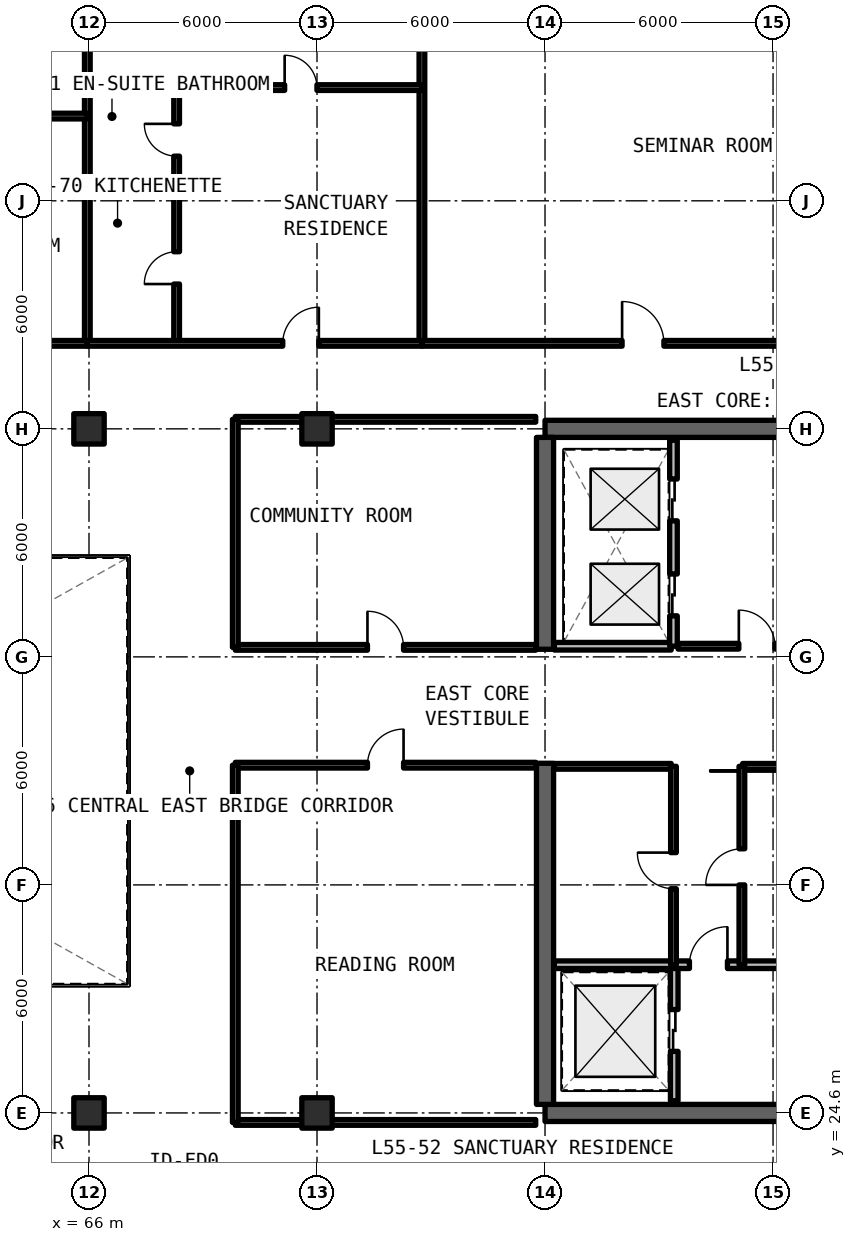
"""IFC4 building model, lengths in metres.
Left out: names, types, materials, properties, quantities, classifications, styles, units other than length and angle.
Written with IfcOpenShell. Run it as: python <this file> out.ifc"""

import sys

from ifc_helpers import new_model, si_unit, direction, frame, frame_2d, origin, origin_2d, place, context, subcontext, project, spatial, rectangle, extrude, element, fill, save


model = new_model("IFC4")
c1 = context("Model", 3, precision=1e-05, world=origin(), true_north=direction((0.0, 1.0)))
c2 = subcontext(c1, "Body", "Model", "MODEL_VIEW")
j1 = project(units=[si_unit("LENGTHUNIT", "METRE"), si_unit("PLANEANGLEUNIT", "RADIAN")], contexts=[c1])
p1 = place(None, origin())
s1 = spatial("IfcSite", under=j1, at=p1, CompositionType="ELEMENT")
p2 = place(p1, origin())
s2 = spatial("IfcBuilding", under=s1, at=p2, CompositionType="ELEMENT")
p3 = place(p2, frame((0.0, 0.0, 198.33)))
s3 = spatial("IfcBuildingStorey", under=s2, at=p3, CompositionType="ELEMENT", Elevation=198.33)
for number, where, z_axis, x_axis in (
    (1, (78.0, 24.6, 0.0), (0.0, 0.0, 1.0), (1.0, 0.0, 0.0)),
    (2, (90.0, 42.6, 0.0), (0.0, 0.0, 1.0), (-1.0, 0.0, 0.0)),
):
    element("IfcWall", number, at=place(p3, frame(where, z_axis=z_axis, x_axis=x_axis)), inside=s3, PredefinedType="SHEAR", context=c2, shape_type="SweptSolid", body=[
        extrude(rectangle(XDim=12.0, YDim=0.45, at=frame_2d((6.0, 0.0))), origin(), (0.0, 0.0, 1.0), 3.3),
    ])
p4 = place(p3, frame((78.0, 24.825, 0.0), z_axis=(0.0, 0.0, 1.0), x_axis=(0.0, 1.0, 0.0)))
e3 = element("IfcWall", 3, at=p4, inside=s3, PredefinedType="SHEAR", context=c2, shape_type="SweptSolid", body=[
    extrude(rectangle(XDim=8.975, YDim=0.45, at=frame_2d((4.488, 0.0))), origin(), (0.0, 0.0, 1.0), 3.3),
])
p5 = place(p3, frame((78.0, 36.8, 0.0), z_axis=(0.0, 0.0, 1.0), x_axis=(0.0, 1.0, 0.0)))
e4 = element("IfcWall", 4, at=p5, inside=s3, PredefinedType="SHEAR", context=c2, shape_type="SweptSolid", body=[
    extrude(rectangle(XDim=5.575, YDim=0.45, at=frame_2d((2.788, 0.0))), origin(), (0.0, 0.0, 1.0), 3.3),
])
for number, where, z_axis, x_axis in (
    (5, (66.0, 24.6, 0.0), (0.0, 0.0, 1.0), (1.0, 0.0, 0.0)),
    (6, (66.0, 42.6, 0.0), (0.0, 0.0, 1.0), (1.0, 0.0, 0.0)),
    (7, (72.0, 24.6, 0.0), (0.0, 0.0, 1.0), (1.0, 0.0, 0.0)),
    (8, (72.0, 42.6, 0.0), (0.0, 0.0, 1.0), (1.0, 0.0, 0.0)),
):
    element("IfcColumn", number, at=place(p3, frame(where, z_axis=z_axis, x_axis=x_axis)), inside=s3, PredefinedType="COLUMN", context=c2, shape_type="SweptSolid", body=[
        extrude(rectangle(XDim=0.8, YDim=0.8, at=origin_2d()), origin(), (0.0, 0.0, 1.0), 3.3),
    ])
p6 = place(p3, frame((81.4, 24.92, 0.0), z_axis=(0.0, 0.0, 1.0), x_axis=(0.0, 1.0, 0.0)))
e9 = element("IfcWall", 9, at=p6, inside=s3, PredefinedType="SOLIDWALL", context=c2, shape_type="SweptSolid", body=[
    extrude(rectangle(XDim=3.58, YDim=0.2, at=frame_2d((1.79, 0.0))), origin(), (0.0, 0.0, 1.0), 2.35),
])
p7 = place(p6, frame((1.3, 0.0, 0.0)))
e10 = element("IfcOpeningElement", 10, at=p7, cuts=e9, PredefinedType="OPENING", context=c2, shape_type="SweptSolid", body=[
    extrude(rectangle(XDim=1.1, YDim=2.2, at=frame_2d((0.55, 1.1))), frame((0.0, 0.11, 0.0), z_axis=(0.0, -1.0, 0.0), x_axis=(1.0, 0.0, 0.0)), (0.0, 0.0, 1.0), 0.22),
])
p8 = place(p3, frame((78.245, 28.5, 0.0), z_axis=(0.0, 0.0, 1.0), x_axis=(1.0, 0.0, 0.0)))
e11 = element("IfcWall", 11, at=p8, inside=s3, PredefinedType="SOLIDWALL", context=c2, shape_type="SweptSolid", body=[
    extrude(rectangle(XDim=7.585, YDim=0.2, at=frame_2d((3.792, 0.0))), origin(), (0.0, 0.0, 1.0), 2.35),
])
p9 = place(p8, frame((3.555, 0.0, 0.0)))
e12 = element("IfcOpeningElement", 12, at=p9, cuts=e11, PredefinedType="OPENING", context=c2, shape_type="SweptSolid", body=[
    extrude(rectangle(XDim=1.0, YDim=2.15, at=frame_2d((0.5, 1.075))), frame((0.0, 0.11, 0.0), z_axis=(0.0, -1.0, 0.0), x_axis=(1.0, 0.0, 0.0)), (0.0, 0.0, 1.0), 0.22),
])
p10 = place(p3, frame((83.2, 33.72, 0.0), z_axis=(0.0, 0.0, 1.0), x_axis=(1.0, 0.0, 0.0)))
e13 = element("IfcWall", 13, at=p10, inside=s3, PredefinedType="SOLIDWALL", context=c2, shape_type="SweptSolid", body=[
    extrude(rectangle(XDim=2.63, YDim=0.15, at=frame_2d((1.315, 0.0))), origin(), (0.0, 0.0, 1.0), 2.35),
])
p11 = place(p3, frame((83.18, 28.5, 0.0), z_axis=(0.0, 0.0, 1.0), x_axis=(0.0, 1.0, 0.0)))
e14 = element("IfcWall", 14, at=p11, inside=s3, PredefinedType="SOLIDWALL", context=c2, shape_type="SweptSolid", body=[
    extrude(rectangle(XDim=5.22, YDim=0.15, at=frame_2d((2.61, 0.0))), origin(), (0.0, 0.0, 1.0), 2.35),
])
p12 = place(p11, frame((2.1, 0.0, 0.0)))
e15 = element("IfcOpeningElement", 15, at=p12, cuts=e14, PredefinedType="OPENING", context=c2, shape_type="SweptSolid", body=[
    extrude(rectangle(XDim=0.95, YDim=2.15, at=frame_2d((0.475, 1.075))), frame((0.0, 0.085, 0.0), z_axis=(0.0, -1.0, 0.0), x_axis=(1.0, 0.0, 0.0)), (0.0, 0.0, 1.0), 0.17),
])
p13 = place(p3, frame((78.245, 33.72, 0.0), z_axis=(0.0, 0.0, 1.0), x_axis=(1.0, 0.0, 0.0)))
e16 = element("IfcWall", 16, at=p13, inside=s3, PredefinedType="SOLIDWALL", context=c2, shape_type="SweptSolid", body=[
    extrude(rectangle(XDim=3.075, YDim=0.15, at=frame_2d((1.538, 0.0))), origin(), (0.0, 0.0, 1.0), 2.35),
])
p14 = place(p3, frame((81.38, 28.5, 0.0), z_axis=(0.0, 0.0, 1.0), x_axis=(0.0, 1.0, 0.0)))
e17 = element("IfcWall", 17, at=p14, inside=s3, PredefinedType="SOLIDWALL", context=c2, shape_type="SweptSolid", body=[
    extrude(rectangle(XDim=5.22, YDim=0.15, at=frame_2d((2.61, 0.0))), origin(), (0.0, 0.0, 1.0), 2.35),
])
p15 = place(p14, frame((2.0, 0.0, 0.0)))
e18 = element("IfcOpeningElement", 18, at=p15, cuts=e17, PredefinedType="OPENING", context=c2, shape_type="SweptSolid", body=[
    extrude(rectangle(XDim=0.95, YDim=2.15, at=frame_2d((0.475, 1.075))), frame((0.0, 0.085, 0.0), z_axis=(0.0, -1.0, 0.0), x_axis=(1.0, 0.0, 0.0)), (0.0, 0.0, 1.0), 0.17),
])
p16 = place(p3, frame((81.5, 36.88, 0.0), z_axis=(0.0, 0.0, 1.0), x_axis=(1.0, 0.0, 0.0)))
e19 = element("IfcWall", 19, at=p16, inside=s3, PredefinedType="SOLIDWALL", context=c2, shape_type="SweptSolid", body=[
    extrude(rectangle(XDim=4.33, YDim=0.15, at=frame_2d((2.165, 0.0))), origin(), (0.0, 0.0, 1.0), 2.35),
])
p17 = place(p16, frame((1.6, 0.0, 0.0)))
e20 = element("IfcOpeningElement", 20, at=p17, cuts=e19, PredefinedType="OPENING", context=c2, shape_type="SweptSolid", body=[
    extrude(rectangle(XDim=0.95, YDim=2.15, at=frame_2d((0.475, 1.075))), frame((0.0, 0.085, 0.0), z_axis=(0.0, -1.0, 0.0), x_axis=(1.0, 0.0, 0.0)), (0.0, 0.0, 1.0), 0.17),
])
p18 = place(p3, frame((78.245, 36.88, 0.0), z_axis=(0.0, 0.0, 1.0), x_axis=(1.0, 0.0, 0.0)))
e21 = element("IfcWall", 21, at=p18, inside=s3, PredefinedType="SOLIDWALL", context=c2, shape_type="SweptSolid", body=[
    extrude(rectangle(XDim=3.075, YDim=0.2, at=frame_2d((1.538, 0.0))), origin(), (0.0, 0.0, 1.0), 2.35),
])
p19 = place(p3, frame((81.38, 36.88, 0.0), z_axis=(0.0, 0.0, 1.0), x_axis=(0.0, 1.0, 0.0)))
e22 = element("IfcWall", 22, at=p19, inside=s3, PredefinedType="SOLIDWALL", context=c2, shape_type="SweptSolid", body=[
    extrude(rectangle(XDim=5.42, YDim=0.2, at=frame_2d((2.71, 0.0))), origin(), (0.0, 0.0, 1.0), 2.35),
])
p20 = place(p19, frame((0.8, 0.0, 0.0)))
e23 = element("IfcOpeningElement", 23, at=p20, cuts=e22, PredefinedType="OPENING", context=c2, shape_type="SweptSolid", body=[
    extrude(rectangle(XDim=1.1, YDim=2.2, at=frame_2d((0.55, 1.1))), frame((0.0, 0.11, 0.0), z_axis=(0.0, -1.0, 0.0), x_axis=(1.0, 0.0, 0.0)), (0.0, 0.0, 1.0), 0.22),
])
p21 = place(p19, frame((3.3, 0.0, 0.0)))
e24 = element("IfcOpeningElement", 24, at=p21, cuts=e22, PredefinedType="OPENING", context=c2, shape_type="SweptSolid", body=[
    extrude(rectangle(XDim=1.1, YDim=2.2, at=frame_2d((0.55, 1.1))), frame((0.0, 0.11, 0.0), z_axis=(0.0, -1.0, 0.0), x_axis=(1.0, 0.0, 0.0)), (0.0, 0.0, 1.0), 0.22),
])
p22 = place(p3, frame((69.85, 24.35, 0.0), z_axis=(0.0, 0.0, 1.0), x_axis=(1.0, 0.0, 0.0)))
e25 = element("IfcWall", 25, at=p22, inside=s3, PredefinedType="SOLIDWALL", context=c2, shape_type="SweptSolid", body=[
    extrude(rectangle(XDim=7.905, YDim=0.15, at=frame_2d((3.952, 0.0))), origin(), (0.0, 0.0, 1.0), 2.35),
])
p23 = place(p3, frame((69.85, 33.75, 0.0), z_axis=(0.0, 0.0, 1.0), x_axis=(1.0, 0.0, 0.0)))
e26 = element("IfcWall", 26, at=p23, inside=s3, PredefinedType="SOLIDWALL", context=c2, shape_type="SweptSolid", body=[
    extrude(rectangle(XDim=7.905, YDim=0.15, at=frame_2d((3.952, 0.0))), origin(), (0.0, 0.0, 1.0), 2.35),
])
p24 = place(p23, frame((3.478, 0.0, 0.0)))
e27 = element("IfcOpeningElement", 27, at=p24, cuts=e26, PredefinedType="OPENING", context=c2, shape_type="SweptSolid", body=[
    extrude(rectangle(XDim=0.95, YDim=2.15, at=frame_2d((0.475, 1.075))), frame((0.0, 0.085, 0.0), z_axis=(0.0, -1.0, 0.0), x_axis=(1.0, 0.0, 0.0)), (0.0, 0.0, 1.0), 0.17),
])
p25 = place(p3, frame((69.85, 24.35, 0.0), z_axis=(0.0, 0.0, 1.0), x_axis=(0.0, 1.0, 0.0)))
e28 = element("IfcWall", 28, at=p25, inside=s3, PredefinedType="SOLIDWALL", context=c2, shape_type="SweptSolid", body=[
    extrude(rectangle(XDim=9.4, YDim=0.15, at=frame_2d((4.7, 0.0))), origin(), (0.0, 0.0, 1.0), 2.35),
])
p26 = place(p3, frame((69.85, 36.85, 0.0), z_axis=(0.0, 0.0, 1.0), x_axis=(1.0, 0.0, 0.0)))
e29 = element("IfcWall", 29, at=p26, inside=s3, PredefinedType="SOLIDWALL", context=c2, shape_type="SweptSolid", body=[
    extrude(rectangle(XDim=7.905, YDim=0.15, at=frame_2d((3.952, 0.0))), origin(), (0.0, 0.0, 1.0), 2.35),
])
p27 = place(p26, frame((3.478, 0.0, 0.0)))
e30 = element("IfcOpeningElement", 30, at=p27, cuts=e29, PredefinedType="OPENING", context=c2, shape_type="SweptSolid", body=[
    extrude(rectangle(XDim=0.95, YDim=2.15, at=frame_2d((0.475, 1.075))), frame((0.0, 0.085, 0.0), z_axis=(0.0, -1.0, 0.0), x_axis=(1.0, 0.0, 0.0)), (0.0, 0.0, 1.0), 0.17),
])
p28 = place(p3, frame((69.85, 42.85, 0.0), z_axis=(0.0, 0.0, 1.0), x_axis=(1.0, 0.0, 0.0)))
e31 = element("IfcWall", 31, at=p28, inside=s3, PredefinedType="SOLIDWALL", context=c2, shape_type="SweptSolid", body=[
    extrude(rectangle(XDim=7.905, YDim=0.15, at=frame_2d((3.952, 0.0))), origin(), (0.0, 0.0, 1.0), 2.35),
])
p29 = place(p3, frame((69.85, 36.85, 0.0), z_axis=(0.0, 0.0, 1.0), x_axis=(0.0, 1.0, 0.0)))
e32 = element("IfcWall", 32, at=p29, inside=s3, PredefinedType="SOLIDWALL", context=c2, shape_type="SweptSolid", body=[
    extrude(rectangle(XDim=6.0, YDim=0.15, at=frame_2d((3.0, 0.0))), origin(), (0.0, 0.0, 1.0), 2.35),
])
p30 = place(p3, frame((65.956, 44.85, 0.0), z_axis=(0.0, 0.0, 1.0), x_axis=(0.0, 1.0, 0.0)))
e33 = element("IfcWall", 33, at=p30, inside=s3, PredefinedType="SOLIDWALL", context=c2, shape_type="SweptSolid", body=[
    extrude(rectangle(XDim=10.08, YDim=0.15, at=frame_2d((5.04, 0.0))), origin(), (0.0, 0.0, 1.0), 2.35),
])
p31 = place(p3, frame((52.12, 50.83, 0.0), z_axis=(0.0, 0.0, 1.0), x_axis=(1.0, 0.0, 0.0)))
e34 = element("IfcWall", 34, at=p31, inside=s3, PredefinedType="PARTITIONING", context=c2, shape_type="SweptSolid", body=[
    extrude(rectangle(XDim=13.836, YDim=0.15, at=frame_2d((6.918, 0.0))), origin(), (0.0, 0.0, 1.0), 2.35),
])
p32 = place(p31, frame((5.073, 0.0, 0.0)))
e35 = element("IfcOpeningElement", 35, at=p32, cuts=e34, PredefinedType="OPENING", context=c2, shape_type="SweptSolid", body=[
    extrude(rectangle(XDim=0.85, YDim=2.1, at=frame_2d((0.425, 1.05))), frame((0.0, 0.085, 0.0), z_axis=(0.0, -1.0, 0.0), x_axis=(1.0, 0.0, 0.0)), (0.0, 0.0, 1.0), 0.17),
])
p33 = place(p31, frame((10.09, 0.0, 0.0)))
e36 = element("IfcOpeningElement", 36, at=p33, cuts=e34, PredefinedType="OPENING", context=c2, shape_type="SweptSolid", body=[
    extrude(rectangle(XDim=0.85, YDim=2.1, at=frame_2d((0.425, 1.05))), frame((0.0, 0.085, 0.0), z_axis=(0.0, -1.0, 0.0), x_axis=(1.0, 0.0, 0.0)), (0.0, 0.0, 1.0), 0.17),
])
p34 = place(p3, frame((52.12, 44.85, 0.0), z_axis=(0.0, 0.0, 1.0), x_axis=(1.0, 0.0, 0.0)))
e37 = element("IfcWall", 37, at=p34, inside=s3, PredefinedType="SOLIDWALL", context=c2, shape_type="SweptSolid", body=[
    extrude(rectangle(XDim=13.836, YDim=0.15, at=frame_2d((6.918, 0.0))), origin(), (0.0, 0.0, 1.0), 2.35),
])
p35 = place(p34, frame((8.383, 0.0, 0.0)))
e38 = element("IfcOpeningElement", 38, at=p35, cuts=e37, PredefinedType="OPENING", context=c2, shape_type="SweptSolid", body=[
    extrude(rectangle(XDim=0.95, YDim=2.15, at=frame_2d((0.475, 1.075))), frame((0.0, 0.085, 0.0), z_axis=(0.0, -1.0, 0.0), x_axis=(1.0, 0.0, 0.0)), (0.0, 0.0, 1.0), 0.17),
])
p36 = place(p3, frame((74.76, 44.85, 0.0), z_axis=(0.0, 0.0, 1.0), x_axis=(0.0, 1.0, 0.0)))
e39 = element("IfcWall", 39, at=p36, inside=s3, PredefinedType="SOLIDWALL", context=c2, shape_type="SweptSolid", body=[
    extrude(rectangle(XDim=10.08, YDim=0.15, at=frame_2d((5.04, 0.0))), origin(), (0.0, 0.0, 1.0), 2.35),
])
p37 = place(p3, frame((65.956, 48.82, 0.0), z_axis=(0.0, 0.0, 1.0), x_axis=(1.0, 0.0, 0.0)))
e40 = element("IfcWall", 40, at=p37, inside=s3, PredefinedType="PARTITIONING", context=c2, shape_type="SweptSolid", body=[
    extrude(rectangle(XDim=2.35, YDim=0.15, at=frame_2d((1.175, 0.0))), origin(), (0.0, 0.0, 1.0), 2.35),
])
p38 = place(p3, frame((68.306, 44.85, 0.0), z_axis=(0.0, 0.0, 1.0), x_axis=(0.0, 1.0, 0.0)))
e41 = element("IfcWall", 41, at=p38, inside=s3, PredefinedType="PARTITIONING", context=c2, shape_type="SweptSolid", body=[
    extrude(rectangle(XDim=6.729, YDim=0.15, at=frame_2d((3.365, 0.0))), origin(), (0.0, 0.0, 1.0), 2.35),
])
p39 = place(p38, frame((1.56, 0.0, 0.0)))
e42 = element("IfcOpeningElement", 42, at=p39, cuts=e41, PredefinedType="OPENING", context=c2, shape_type="SweptSolid", body=[
    extrude(rectangle(XDim=0.85, YDim=2.1, at=frame_2d((0.425, 1.05))), frame((0.0, 0.085, 0.0), z_axis=(0.0, -1.0, 0.0), x_axis=(1.0, 0.0, 0.0)), (0.0, 0.0, 1.0), 0.17),
])
p40 = place(p38, frame((4.925, 0.0, 0.0)))
e43 = element("IfcOpeningElement", 43, at=p40, cuts=e41, PredefinedType="OPENING", context=c2, shape_type="SweptSolid", body=[
    extrude(rectangle(XDim=0.85, YDim=2.1, at=frame_2d((0.425, 1.05))), frame((0.0, 0.085, 0.0), z_axis=(0.0, -1.0, 0.0), x_axis=(1.0, 0.0, 0.0)), (0.0, 0.0, 1.0), 0.17),
])
p41 = place(p3, frame((65.956, 51.58, 0.0), z_axis=(0.0, 0.0, 1.0), x_axis=(1.0, 0.0, 0.0)))
e44 = element("IfcWall", 44, at=p41, inside=s3, PredefinedType="PARTITIONING", context=c2, shape_type="SweptSolid", body=[
    extrude(rectangle(XDim=8.805, YDim=0.15, at=frame_2d((4.402, 0.0))), origin(), (0.0, 0.0, 1.0), 2.35),
])
p42 = place(p41, frame((5.192, 0.0, 0.0)))
e45 = element("IfcOpeningElement", 45, at=p42, cuts=e44, PredefinedType="OPENING", context=c2, shape_type="SweptSolid", body=[
    extrude(rectangle(XDim=0.85, YDim=2.1, at=frame_2d((0.425, 1.05))), frame((0.0, 0.085, 0.0), z_axis=(0.0, -1.0, 0.0), x_axis=(1.0, 0.0, 0.0)), (0.0, 0.0, 1.0), 0.17),
])
p43 = place(p3, frame((65.956, 44.85, 0.0), z_axis=(0.0, 0.0, 1.0), x_axis=(1.0, 0.0, 0.0)))
e46 = element("IfcWall", 46, at=p43, inside=s3, PredefinedType="SOLIDWALL", context=c2, shape_type="SweptSolid", body=[
    extrude(rectangle(XDim=8.805, YDim=0.15, at=frame_2d((4.402, 0.0))), origin(), (0.0, 0.0, 1.0), 2.35),
])
p44 = place(p43, frame((5.142, 0.0, 0.0)))
e47 = element("IfcOpeningElement", 47, at=p44, cuts=e46, PredefinedType="OPENING", context=c2, shape_type="SweptSolid", body=[
    extrude(rectangle(XDim=0.95, YDim=2.15, at=frame_2d((0.475, 1.075))), frame((0.0, 0.085, 0.0), z_axis=(0.0, -1.0, 0.0), x_axis=(1.0, 0.0, 0.0)), (0.0, 0.0, 1.0), 0.17),
])
p45 = place(p3, frame((74.76, 44.85, 0.0), z_axis=(0.0, 0.0, 1.0), x_axis=(1.0, 0.0, 0.0)))
e48 = element("IfcWall", 48, at=p45, inside=s3, PredefinedType="SOLIDWALL", context=c2, shape_type="SweptSolid", body=[
    extrude(rectangle(XDim=11.635, YDim=0.15, at=frame_2d((5.817, 0.0))), origin(), (0.0, 0.0, 1.0), 2.35),
])
p46 = place(p45, frame((5.267, 0.0, 0.0)))
e49 = element("IfcOpeningElement", 49, at=p46, cuts=e48, PredefinedType="OPENING", context=c2, shape_type="SweptSolid", body=[
    extrude(rectangle(XDim=1.1, YDim=2.15, at=frame_2d((0.55, 1.075))), frame((0.0, 0.085, 0.0), z_axis=(0.0, -1.0, 0.0), x_axis=(1.0, 0.0, 0.0)), (0.0, 0.0, 1.0), 0.17),
])
p47 = place(p7, origin())
e50 = element("IfcDoor", 50, at=p47, inside=s3, OperationType="SLIDING_TO_LEFT", PredefinedType="DOOR", context=c2, shape_type="SweptSolid", body=[
    extrude(rectangle(XDim=1.1, YDim=2.2, at=frame_2d((0.55, 1.1))), frame((0.0, 0.025, 0.0), z_axis=(0.0, -1.0, 0.0), x_axis=(1.0, 0.0, 0.0)), (0.0, 0.0, 1.0), 0.05),
])
fill(e10, e50)
p48 = place(p9, origin())
e51 = element("IfcDoor", 51, at=p48, inside=s3, OperationType="SINGLE_SWING_RIGHT", PredefinedType="DOOR", context=c2, shape_type="SweptSolid", body=[
    extrude(rectangle(XDim=1.0, YDim=2.15, at=frame_2d((0.5, 1.075))), frame((0.0, 0.025, 0.0), z_axis=(0.0, -1.0, 0.0), x_axis=(1.0, 0.0, 0.0)), (0.0, 0.0, 1.0), 0.05),
])
fill(e12, e51)
p49 = place(p12, origin())
e52 = element("IfcDoor", 52, at=p49, inside=s3, OperationType="SINGLE_SWING_LEFT", PredefinedType="DOOR", context=c2, shape_type="SweptSolid", body=[
    extrude(rectangle(XDim=0.95, YDim=2.15, at=frame_2d((0.475, 1.075))), frame((0.0, 0.025, 0.0), z_axis=(0.0, -1.0, 0.0), x_axis=(1.0, 0.0, 0.0)), (0.0, 0.0, 1.0), 0.05),
])
fill(e15, e52)
p50 = place(p15, origin())
e53 = element("IfcDoor", 53, at=p50, inside=s3, OperationType="SINGLE_SWING_RIGHT", PredefinedType="DOOR", context=c2, shape_type="SweptSolid", body=[
    extrude(rectangle(XDim=0.95, YDim=2.15, at=frame_2d((0.475, 1.075))), frame((0.0, 0.025, 0.0), z_axis=(0.0, -1.0, 0.0), x_axis=(1.0, 0.0, 0.0)), (0.0, 0.0, 1.0), 0.05),
])
fill(e18, e53)
p51 = place(p17, origin())
e54 = element("IfcDoor", 54, at=p51, inside=s3, OperationType="SINGLE_SWING_LEFT", PredefinedType="DOOR", context=c2, shape_type="SweptSolid", body=[
    extrude(rectangle(XDim=0.95, YDim=2.15, at=frame_2d((0.475, 1.075))), frame((0.0, 0.025, 0.0), z_axis=(0.0, -1.0, 0.0), x_axis=(1.0, 0.0, 0.0)), (0.0, 0.0, 1.0), 0.05),
])
fill(e20, e54)
p52 = place(p20, origin())
e55 = element("IfcDoor", 55, at=p52, inside=s3, OperationType="SLIDING_TO_LEFT", PredefinedType="DOOR", context=c2, shape_type="SweptSolid", body=[
    extrude(rectangle(XDim=1.1, YDim=2.2, at=frame_2d((0.55, 1.1))), frame((0.0, 0.025, 0.0), z_axis=(0.0, -1.0, 0.0), x_axis=(1.0, 0.0, 0.0)), (0.0, 0.0, 1.0), 0.05),
])
fill(e23, e55)
p53 = place(p21, origin())
e56 = element("IfcDoor", 56, at=p53, inside=s3, OperationType="SLIDING_TO_RIGHT", PredefinedType="DOOR", context=c2, shape_type="SweptSolid", body=[
    extrude(rectangle(XDim=1.1, YDim=2.2, at=frame_2d((0.55, 1.1))), frame((0.0, 0.025, 0.0), z_axis=(0.0, -1.0, 0.0), x_axis=(1.0, 0.0, 0.0)), (0.0, 0.0, 1.0), 0.05),
])
fill(e24, e56)
p54 = place(p24, origin())
e57 = element("IfcDoor", 57, at=p54, inside=s3, OperationType="SINGLE_SWING_RIGHT", PredefinedType="DOOR", context=c2, shape_type="SweptSolid", body=[
    extrude(rectangle(XDim=0.95, YDim=2.15, at=frame_2d((0.475, 1.075))), frame((0.0, 0.025, 0.0), z_axis=(0.0, -1.0, 0.0), x_axis=(1.0, 0.0, 0.0)), (0.0, 0.0, 1.0), 0.05),
])
fill(e27, e57)
p55 = place(p27, origin())
e58 = element("IfcDoor", 58, at=p55, inside=s3, OperationType="SINGLE_SWING_LEFT", PredefinedType="DOOR", context=c2, shape_type="SweptSolid", body=[
    extrude(rectangle(XDim=0.95, YDim=2.15, at=frame_2d((0.475, 1.075))), frame((0.0, 0.025, 0.0), z_axis=(0.0, -1.0, 0.0), x_axis=(1.0, 0.0, 0.0)), (0.0, 0.0, 1.0), 0.05),
])
fill(e30, e58)
p56 = place(p39, origin())
e59 = element("IfcDoor", 59, at=p56, inside=s3, OperationType="SINGLE_SWING_LEFT", PredefinedType="DOOR", context=c2, shape_type="SweptSolid", body=[
    extrude(rectangle(XDim=0.85, YDim=2.1, at=frame_2d((0.425, 1.05))), frame((0.0, 0.025, 0.0), z_axis=(0.0, -1.0, 0.0), x_axis=(1.0, 0.0, 0.0)), (0.0, 0.0, 1.0), 0.05),
])
fill(e42, e59)
p57 = place(p40, origin())
e60 = element("IfcDoor", 60, at=p57, inside=s3, OperationType="SINGLE_SWING_RIGHT", PredefinedType="DOOR", context=c2, shape_type="SweptSolid", body=[
    extrude(rectangle(XDim=0.85, YDim=2.1, at=frame_2d((0.425, 1.05))), frame((0.0, 0.025, 0.0), z_axis=(0.0, -1.0, 0.0), x_axis=(1.0, 0.0, 0.0)), (0.0, 0.0, 1.0), 0.05),
])
fill(e43, e60)
p58 = place(p42, origin())
e61 = element("IfcDoor", 61, at=p58, inside=s3, OperationType="SINGLE_SWING_LEFT", PredefinedType="DOOR", context=c2, shape_type="SweptSolid", body=[
    extrude(rectangle(XDim=0.85, YDim=2.1, at=frame_2d((0.425, 1.05))), frame((0.0, 0.025, 0.0), z_axis=(0.0, -1.0, 0.0), x_axis=(1.0, 0.0, 0.0)), (0.0, 0.0, 1.0), 0.05),
])
fill(e45, e61)
p59 = place(p44, origin())
e62 = element("IfcDoor", 62, at=p59, inside=s3, OperationType="SINGLE_SWING_RIGHT", PredefinedType="DOOR", context=c2, shape_type="SweptSolid", body=[
    extrude(rectangle(XDim=0.95, YDim=2.15, at=frame_2d((0.475, 1.075))), frame((0.0, 0.025, 0.0), z_axis=(0.0, -1.0, 0.0), x_axis=(1.0, 0.0, 0.0)), (0.0, 0.0, 1.0), 0.05),
])
fill(e47, e62)
p60 = place(p46, origin())
e63 = element("IfcDoor", 63, at=p60, inside=s3, OperationType="SINGLE_SWING_LEFT", PredefinedType="DOOR", context=c2, shape_type="SweptSolid", body=[
    extrude(rectangle(XDim=1.1, YDim=2.15, at=frame_2d((0.55, 1.075))), frame((0.0, 0.025, 0.0), z_axis=(0.0, -1.0, 0.0), x_axis=(1.0, 0.0, 0.0)), (0.0, 0.0, 1.0), 0.05),
])
fill(e49, e63)
save(model, sys.argv[1])
